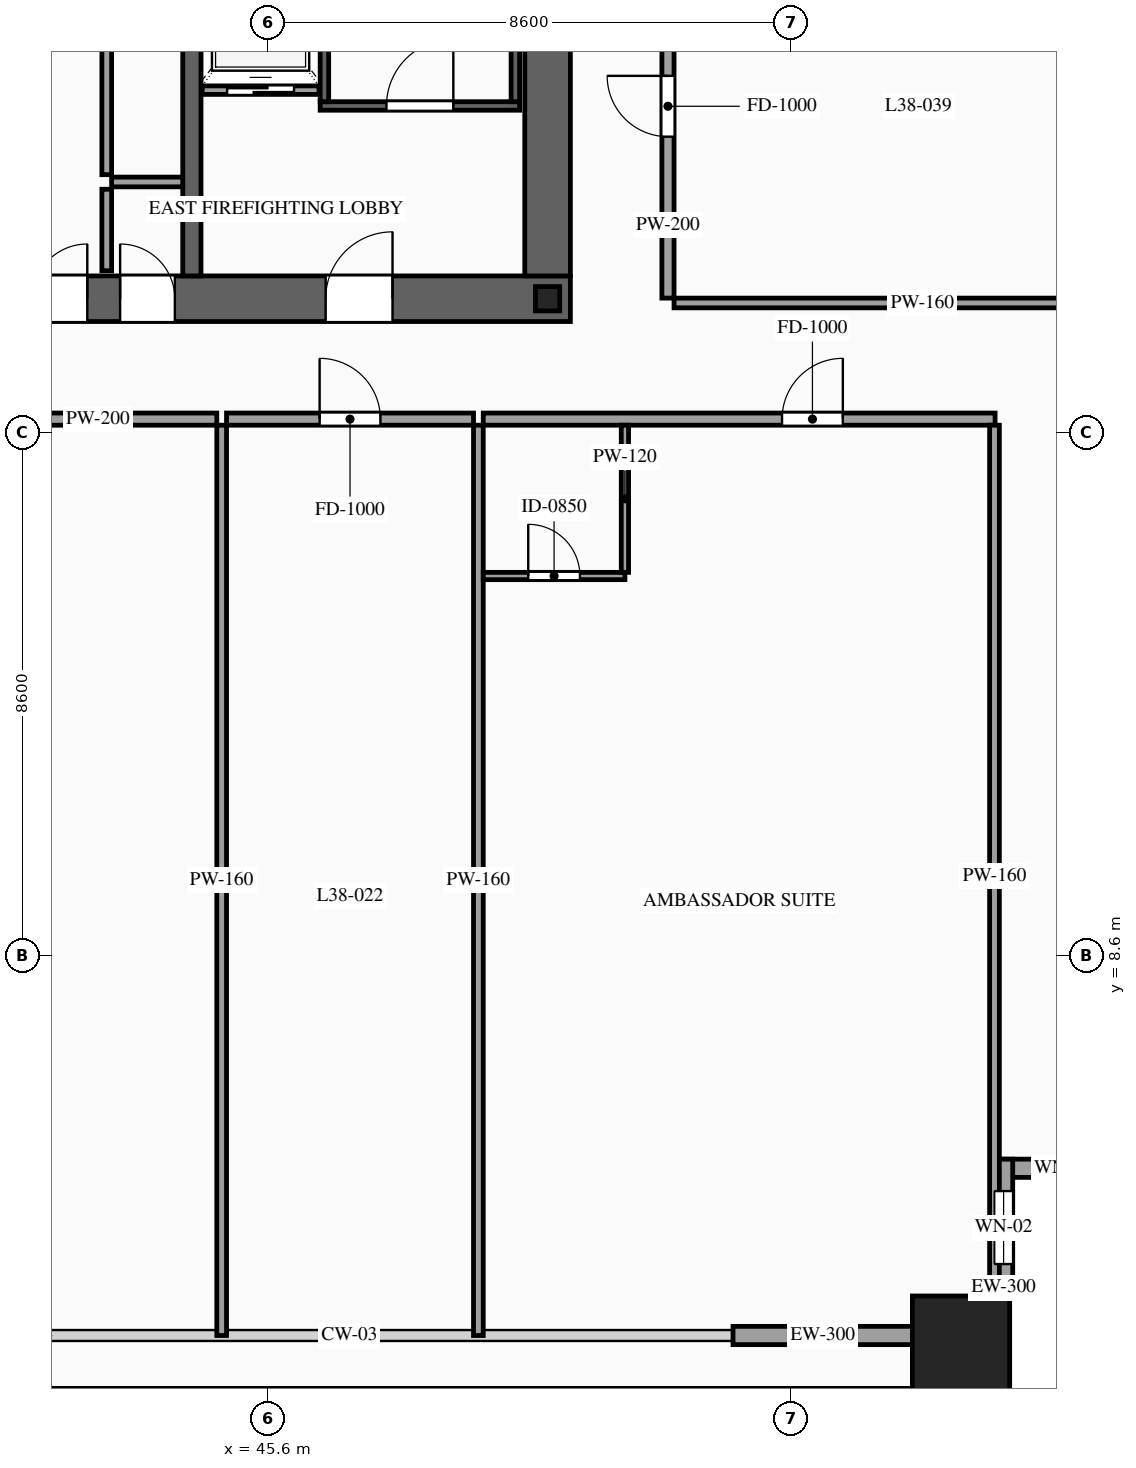
"""IFC4 building model, lengths in metres.
Left out: names, types, materials, properties, quantities, classifications, styles, units other than length and angle.
Written with IfcOpenShell. Run it as: python <this file> out.ifc"""

import sys

from ifc_helpers import new_model, si_unit, direction, frame, frame_2d, origin, origin_2d, place, context, subcontext, project, spatial, rectangle, hollow_rectangle, i_section, extrude, source, transform, mapped, element, fill, save


model = new_model("IFC4")
c1 = context("Model", 3, precision=1e-05, world=origin(), true_north=direction((0.0, 1.0)))
c2 = subcontext(c1, "Body", "Model", "MODEL_VIEW")
j1 = project(units=[si_unit("LENGTHUNIT", "METRE"), si_unit("PLANEANGLEUNIT", "RADIAN")], contexts=[c1])
p1 = place(None, origin())
s1 = spatial("IfcSite", under=j1, at=p1, CompositionType="ELEMENT")
p2 = place(p1, origin())
s2 = spatial("IfcBuilding", under=s1, at=p2, CompositionType="ELEMENT")
p3 = place(p2, frame((0.0, 0.0, 145.2)))
s3 = spatial("IfcBuildingStorey", under=s2, at=p3, CompositionType="ELEMENT", Elevation=145.2)
p4 = place(p3, frame((23.425, 19.4, 0.0), z_axis=(0.0, 0.0, 1.0), x_axis=(1.0, 0.0, 0.0)))
e1 = element("IfcWall", 1, at=p4, inside=s3, PredefinedType="SHEAR", context=c2, shape_type="SweptSolid", body=[
    extrude(rectangle(XDim=27.15, YDim=0.75, at=frame_2d((13.575, 0.0))), origin(), (0.0, 0.0, 1.0), 3.6),
])
p5 = place(p4, frame((2.025, 0.0, 0.0)))
e2 = element("IfcOpeningElement", 2, at=p5, cuts=e1, PredefinedType="OPENING", context=c2, shape_type="SweptSolid", body=[
    extrude(rectangle(XDim=1.1, YDim=2.2, at=frame_2d((0.55, 1.1))), frame((0.0, 0.39, 0.0), z_axis=(0.0, -1.0, 0.0), x_axis=(1.0, 0.0, 0.0)), (0.0, 0.0, 1.0), 0.78),
])
p6 = place(p4, frame((9.925, 0.0, 0.0)))
e3 = element("IfcOpeningElement", 3, at=p6, cuts=e1, PredefinedType="OPENING", context=c2, shape_type="SweptSolid", body=[
    extrude(rectangle(XDim=1.1, YDim=2.2, at=frame_2d((0.55, 1.1))), frame((0.0, 0.39, 0.0), z_axis=(0.0, -1.0, 0.0), x_axis=(1.0, 0.0, 0.0)), (0.0, 0.0, 1.0), 0.78),
])
p7 = place(p4, frame((23.125, 0.0, 0.0)))
e4 = element("IfcOpeningElement", 4, at=p7, cuts=e1, PredefinedType="OPENING", context=c2, shape_type="SweptSolid", body=[
    extrude(rectangle(XDim=1.1, YDim=2.2, at=frame_2d((0.55, 1.1))), frame((0.0, 0.39, 0.0), z_axis=(0.0, -1.0, 0.0), x_axis=(1.0, 0.0, 0.0)), (0.0, 0.0, 1.0), 0.78),
])
p8 = place(p4, frame((19.745, 0.0, 0.0)))
e5 = element("IfcOpeningElement", 5, at=p8, cuts=e1, PredefinedType="OPENING", context=c2, shape_type="SweptSolid", body=[
    extrude(rectangle(XDim=0.9, YDim=2.15, at=frame_2d((0.45, 1.075))), frame((0.0, 0.39, 0.0), z_axis=(0.0, -1.0, 0.0), x_axis=(1.0, 0.0, 0.0)), (0.0, 0.0, 1.0), 0.78),
])
p9 = place(p4, frame((18.305, 0.0, 0.0)))
e6 = element("IfcOpeningElement", 6, at=p9, cuts=e1, PredefinedType="OPENING", context=c2, shape_type="SweptSolid", body=[
    extrude(rectangle(XDim=0.9, YDim=2.15, at=frame_2d((0.45, 1.075))), frame((0.0, 0.39, 0.0), z_axis=(0.0, -1.0, 0.0), x_axis=(1.0, 0.0, 0.0)), (0.0, 0.0, 1.0), 0.78),
])
m1 = source(origin(), c2, "Body", "SweptSolid", [
    extrude(rectangle(XDim=12.05, YDim=0.75, at=frame_2d((6.025, 0.0))), origin(), (0.0, 0.0, 1.0), 3.6),
])
p10 = place(p3, frame((50.2, 19.775, 0.0), z_axis=(0.0, 0.0, 1.0), x_axis=(0.0, 1.0, 0.0)))
e7 = element("IfcWall", 7, at=p10, inside=s3, PredefinedType="SHEAR", context=c2, shape_type="MappedRepresentation", body=[
    mapped(m1, transform((0.0, 0.0, 0.0), scale=1.0)),
])
m2 = source(origin(), c2, "Body", "SweptSolid", [
    extrude(rectangle(XDim=12.05, YDim=0.3, at=frame_2d((6.025, 0.0))), origin(), (0.0, 0.0, 1.0), 3.6),
])
p11 = place(p3, frame((44.35, 19.775, 0.0), z_axis=(0.0, 0.0, 1.0), x_axis=(0.0, 1.0, 0.0)))
e8 = element("IfcWall", 8, at=p11, inside=s3, PredefinedType="SOLIDWALL", context=c2, shape_type="MappedRepresentation", body=[
    mapped(m2, transform((0.0, 0.0, 0.0), scale=1.0)),
])
m3 = source(origin(), c2, "Body", "SweptSolid", [
    extrude(i_section(OverallWidth=0.4, OverallDepth=0.4, WebThickness=0.013, FlangeThickness=0.021, at=origin_2d()), origin(), (0.0, 0.0, 1.0), 3.6),
])
p12 = place(p3, frame((50.2, 19.4, 0.0), z_axis=(0.0, 0.0, 1.0), x_axis=(1.0, 0.0, 0.0)))
e9 = element("IfcColumn", 9, at=p12, inside=s3, PredefinedType="COLUMN", context=c2, shape_type="MappedRepresentation", body=[
    mapped(m3, transform((0.0, 0.0, 0.0), scale=1.0)),
])
m4 = source(origin(), c2, "Body", "SweptSolid", [
    extrude(hollow_rectangle(XDim=1.6, YDim=1.6, WallThickness=0.07, at=origin_2d()), origin(), (0.0, 0.0, 1.0), 3.6),
])
p13 = place(p3, frame((57.0, 2.2, 0.0), z_axis=(0.0, 0.0, 1.0), x_axis=(1.0, 0.0, 0.0)))
e10 = element("IfcColumn", 10, at=p13, inside=s3, PredefinedType="COLUMN", context=c2, shape_type="MappedRepresentation", body=[
    mapped(m4, transform((0.0, 0.0, 0.0), scale=1.0)),
])
p14 = place(p3, frame((57.55, 5.1, 0.0), z_axis=(0.0, 0.0, 1.0), x_axis=(1.0, 0.0, 0.0)))
e11 = element("IfcWall", 11, at=p14, inside=s3, PredefinedType="SOLIDWALL", context=c2, shape_type="SweptSolid", body=[
    extrude(rectangle(XDim=2.25, YDim=0.3, at=frame_2d((1.125, 0.0))), origin(), (0.0, 0.0, 1.0), 3.38),
])
p15 = place(p14, frame((0.675, 0.0, 0.85)))
e12 = element("IfcOpeningElement", 12, at=p15, cuts=e11, PredefinedType="OPENING", context=c2, shape_type="SweptSolid", body=[
    extrude(rectangle(XDim=0.9, YDim=1.5, at=frame_2d((0.45, 0.75))), frame((0.0, 0.165, 0.0), z_axis=(0.0, -1.0, 0.0), x_axis=(1.0, 0.0, 0.0)), (0.0, 0.0, 1.0), 0.33),
])
p16 = place(p3, frame((57.7, 3.0, 0.0), z_axis=(0.0, 0.0, 1.0), x_axis=(0.0, 1.0, 0.0)))
e13 = element("IfcWall", 13, at=p16, inside=s3, PredefinedType="SOLIDWALL", context=c2, shape_type="SweptSolid", body=[
    extrude(rectangle(XDim=2.25, YDim=0.3, at=frame_2d((1.125, 0.0))), origin(), (0.0, 0.0, 1.0), 3.38),
])
p17 = place(p16, frame((0.525, 0.0, 0.85)))
e14 = element("IfcOpeningElement", 14, at=p17, cuts=e13, PredefinedType="OPENING", context=c2, shape_type="SweptSolid", body=[
    extrude(rectangle(XDim=1.2, YDim=2.1, at=frame_2d((0.6, 1.05))), frame((0.0, 0.165, 0.0), z_axis=(0.0, -1.0, 0.0), x_axis=(1.0, 0.0, 0.0)), (0.0, 0.0, 1.0), 0.33),
])
m5 = source(origin(), c2, "Body", "SweptSolid", [
    extrude(rectangle(XDim=2.95, YDim=0.3, at=frame_2d((1.475, 0.0))), origin(), (0.0, 0.0, 1.0), 2.775),
])
p18 = place(p3, frame((53.25, 2.35, 0.0), z_axis=(0.0, 0.0, 1.0), x_axis=(1.0, 0.0, 0.0)))
e15 = element("IfcWall", 15, at=p18, inside=s3, PredefinedType="SOLIDWALL", context=c2, shape_type="MappedRepresentation", body=[
    mapped(m5, transform((0.0, 0.0, 0.0), scale=1.0)),
])
p19 = place(p3, frame((44.52, 22.83, 0.0), z_axis=(0.0, 0.0, 1.0), x_axis=(1.0, 0.0, 0.0)))
e16 = element("IfcWall", 16, at=p19, inside=s3, PredefinedType="SOLIDWALL", context=c2, shape_type="SweptSolid", body=[
    extrude(rectangle(XDim=1.92, YDim=0.14, at=frame_2d((0.96, 0.0))), origin(), (0.0, 0.0, 1.0), 3.38),
])
p20 = place(p19, frame((0.41, 0.0, 0.0)))
e17 = element("IfcOpeningElement", 17, at=p20, cuts=e16, PredefinedType="OPENING", context=c2, shape_type="SweptSolid", body=[
    extrude(rectangle(XDim=1.1, YDim=2.2, at=frame_2d((0.55, 1.1))), frame((0.0, 0.085, 0.0), z_axis=(0.0, -1.0, 0.0), x_axis=(1.0, 0.0, 0.0)), (0.0, 0.0, 1.0), 0.17),
])
p21 = place(p3, frame((46.46, 22.57, 0.0), z_axis=(0.0, 0.0, 1.0), x_axis=(1.0, 0.0, 0.0)))
e18 = element("IfcWall", 18, at=p21, inside=s3, PredefinedType="SOLIDWALL", context=c2, shape_type="SweptSolid", body=[
    extrude(rectangle(XDim=3.28, YDim=0.14, at=frame_2d((1.64, 0.0))), origin(), (0.0, 0.0, 1.0), 3.38),
])
p22 = place(p21, frame((1.09, 0.0, 0.0)))
e19 = element("IfcOpeningElement", 19, at=p22, cuts=e18, PredefinedType="OPENING", context=c2, shape_type="SweptSolid", body=[
    extrude(rectangle(XDim=1.1, YDim=2.2, at=frame_2d((0.55, 1.1))), frame((0.0, 0.085, 0.0), z_axis=(0.0, -1.0, 0.0), x_axis=(1.0, 0.0, 0.0)), (0.0, 0.0, 1.0), 0.17),
])
m6 = source(origin(), c2, "Body", "SweptSolid", [
    extrude(rectangle(XDim=8.94, YDim=0.14, at=frame_2d((4.47, 0.0))), origin(), (0.0, 0.0, 1.0), 3.38),
])
for number, where, z_axis, x_axis in (
    (20, (46.53, 22.64, 0.0), (0.0, 0.0, 1.0), (0.0, 1.0, 0.0)),
    (21, (49.67, 22.64, 0.0), (0.0, 0.0, 1.0), (0.0, 1.0, 0.0)),
):
    element("IfcWall", number, at=place(p3, frame(where, z_axis=z_axis, x_axis=x_axis)), inside=s3, PredefinedType="SOLIDWALL", context=c2, shape_type="MappedRepresentation", body=[
        mapped(m6, transform((0.0, 0.0, 0.0), scale=1.0)),
    ])
m7 = source(origin(), c2, "Body", "SweptSolid", [
    extrude(rectangle(XDim=1.34, YDim=0.16, at=frame_2d((0.67, 0.0))), origin(), (0.0, 0.0, 1.0), 3.38),
])
p23 = place(p3, frame((42.95, 19.86, 0.0), z_axis=(0.0, 0.0, 1.0), x_axis=(0.0, 1.0, 0.0)))
e22 = element("IfcWall", 22, at=p23, inside=s3, PredefinedType="PARTITIONING", context=c2, shape_type="MappedRepresentation", body=[
    mapped(m7, transform((0.0, 0.0, 0.0), scale=1.0)),
])
m8 = source(origin(), c2, "Body", "SweptSolid", [
    extrude(rectangle(XDim=1.17, YDim=0.16, at=frame_2d((0.585, 0.0))), origin(), (0.0, 0.0, 1.0), 3.38),
])
p24 = place(p3, frame((43.03, 21.32, 0.0), z_axis=(0.0, 0.0, 1.0), x_axis=(1.0, 0.0, 0.0)))
e23 = element("IfcWall", 23, at=p24, inside=s3, PredefinedType="PARTITIONING", context=c2, shape_type="MappedRepresentation", body=[
    mapped(m8, transform((0.0, 0.0, 0.0), scale=1.0)),
])
m9 = source(origin(), c2, "Body", "SweptSolid", [
    extrude(rectangle(XDim=10.72, YDim=0.16, at=frame_2d((5.36, 0.0))), origin(), (0.0, 0.0, 1.0), 3.38),
])
p25 = place(p3, frame((42.95, 21.44, 0.0), z_axis=(0.0, 0.0, 1.0), x_axis=(0.0, 1.0, 0.0)))
e24 = element("IfcWall", 24, at=p25, inside=s3, PredefinedType="PARTITIONING", context=c2, shape_type="MappedRepresentation", body=[
    mapped(m9, transform((0.0, 0.0, 0.0), scale=1.0)),
])
p26 = place(p3, frame((35.435, 17.42, 0.0), z_axis=(0.0, 0.0, 1.0), x_axis=(1.0, 0.0, 0.0)))
e25 = element("IfcWall", 25, at=p26, inside=s3, PredefinedType="PARTITIONING", context=c2, shape_type="SweptSolid", body=[
    extrude(rectangle(XDim=9.325, YDim=0.2, at=frame_2d((4.663, 0.0))), origin(), (0.0, 0.0, 1.0), 3.38),
])
p27 = place(p26, frame((4.162, 0.0, 0.0)))
e26 = element("IfcOpeningElement", 26, at=p27, cuts=e25, PredefinedType="OPENING", context=c2, shape_type="SweptSolid", body=[
    extrude(rectangle(XDim=1.0, YDim=2.2, at=frame_2d((0.5, 1.1))), frame((0.0, 0.115, 0.0), z_axis=(0.0, -1.0, 0.0), x_axis=(1.0, 0.0, 0.0)), (0.0, 0.0, 1.0), 0.23),
])
m10 = source(origin(), c2, "Body", "SweptSolid", [
    extrude(rectangle(XDim=14.97, YDim=0.16, at=frame_2d((7.485, 0.0))), origin(), (0.0, 0.0, 1.0), 3.38),
])
p28 = place(p3, frame((44.84, 2.35, 0.0), z_axis=(0.0, 0.0, 1.0), x_axis=(0.0, 1.0, 0.0)))
e27 = element("IfcWall", 27, at=p28, inside=s3, PredefinedType="PARTITIONING", context=c2, shape_type="MappedRepresentation", body=[
    mapped(m10, transform((0.0, 0.0, 0.0), scale=1.0)),
])
p29 = place(p3, frame((44.92, 17.42, 0.0), z_axis=(0.0, 0.0, 1.0), x_axis=(1.0, 0.0, 0.0)))
e28 = element("IfcWall", 28, at=p29, inside=s3, PredefinedType="PARTITIONING", context=c2, shape_type="SweptSolid", body=[
    extrude(rectangle(XDim=4.062, YDim=0.2, at=frame_2d((2.031, 0.0))), origin(), (0.0, 0.0, 1.0), 3.38),
])
p30 = place(p29, frame((1.531, 0.0, 0.0)))
e29 = element("IfcOpeningElement", 29, at=p30, cuts=e28, PredefinedType="OPENING", context=c2, shape_type="SweptSolid", body=[
    extrude(rectangle(XDim=1.0, YDim=2.2, at=frame_2d((0.5, 1.1))), frame((0.0, 0.115, 0.0), z_axis=(0.0, -1.0, 0.0), x_axis=(1.0, 0.0, 0.0)), (0.0, 0.0, 1.0), 0.23),
])
p31 = place(p3, frame((49.062, 2.35, 0.0), z_axis=(0.0, 0.0, 1.0), x_axis=(0.0, 1.0, 0.0)))
e30 = element("IfcWall", 30, at=p31, inside=s3, PredefinedType="PARTITIONING", context=c2, shape_type="MappedRepresentation", body=[
    mapped(m10, transform((0.0, 0.0, 0.0), scale=1.0)),
])
p32 = place(p3, frame((49.142, 17.42, 0.0), z_axis=(0.0, 0.0, 1.0), x_axis=(1.0, 0.0, 0.0)))
e31 = element("IfcWall", 31, at=p32, inside=s3, PredefinedType="PARTITIONING", context=c2, shape_type="SweptSolid", body=[
    extrude(rectangle(XDim=8.418, YDim=0.2, at=frame_2d((4.209, 0.0))), origin(), (0.0, 0.0, 1.0), 3.38),
])
p33 = place(p32, frame((4.914, 0.0, 0.0)))
e32 = element("IfcOpeningElement", 32, at=p33, cuts=e31, PredefinedType="OPENING", context=c2, shape_type="SweptSolid", body=[
    extrude(rectangle(XDim=1.0, YDim=2.2, at=frame_2d((0.5, 1.1))), frame((0.0, 0.115, 0.0), z_axis=(0.0, -1.0, 0.0), x_axis=(1.0, 0.0, 0.0)), (0.0, 0.0, 1.0), 0.23),
])
m11 = source(origin(), c2, "Body", "SweptSolid", [
    extrude(rectangle(XDim=14.82, YDim=0.16, at=frame_2d((7.41, 0.0))), origin(), (0.0, 0.0, 1.0), 3.38),
])
p34 = place(p3, frame((57.55, 2.5, 0.0), z_axis=(0.0, 0.0, 1.0), x_axis=(0.0, 1.0, 0.0)))
e33 = element("IfcWall", 33, at=p34, inside=s3, PredefinedType="PARTITIONING", context=c2, shape_type="MappedRepresentation", body=[
    mapped(m11, transform((0.0, 0.0, 0.0), scale=1.0)),
])
p35 = place(p3, frame((49.142, 14.84, 0.0), z_axis=(0.0, 0.0, 1.0), x_axis=(1.0, 0.0, 0.0)))
e34 = element("IfcWall", 34, at=p35, inside=s3, PredefinedType="PARTITIONING", context=c2, shape_type="SweptSolid", body=[
    extrude(rectangle(XDim=2.33, YDim=0.12, at=frame_2d((1.165, 0.0))), origin(), (0.0, 0.0, 1.0), 3.38),
])
p36 = place(p35, frame((0.74, 0.0, 0.0)))
e35 = element("IfcOpeningElement", 35, at=p36, cuts=e34, PredefinedType="OPENING", context=c2, shape_type="SweptSolid", body=[
    extrude(rectangle(XDim=0.85, YDim=2.1, at=frame_2d((0.425, 1.05))), frame((0.0, 0.075, 0.0), z_axis=(0.0, -1.0, 0.0), x_axis=(1.0, 0.0, 0.0)), (0.0, 0.0, 1.0), 0.15),
])
m12 = source(origin(), c2, "Body", "SweptSolid", [
    extrude(rectangle(XDim=2.42, YDim=0.12, at=frame_2d((1.21, 0.0))), origin(), (0.0, 0.0, 1.0), 3.38),
])
p37 = place(p3, frame((51.472, 14.9, 0.0), z_axis=(0.0, 0.0, 1.0), x_axis=(0.0, 1.0, 0.0)))
e36 = element("IfcWall", 36, at=p37, inside=s3, PredefinedType="PARTITIONING", context=c2, shape_type="MappedRepresentation", body=[
    mapped(m12, transform((0.0, 0.0, 0.0), scale=1.0)),
])
p38 = place(p3, frame((52.18, 19.41, 0.0), z_axis=(0.0, 0.0, 1.0), x_axis=(0.0, 1.0, 0.0)))
e37 = element("IfcWall", 37, at=p38, inside=s3, PredefinedType="PARTITIONING", context=c2, shape_type="SweptSolid", body=[
    extrude(rectangle(XDim=6.31, YDim=0.2, at=frame_2d((3.155, 0.0))), origin(), (0.0, 0.0, 1.0), 3.38),
])
p39 = place(p38, frame((2.655, 0.0, 0.0)))
e38 = element("IfcOpeningElement", 38, at=p39, cuts=e37, PredefinedType="OPENING", context=c2, shape_type="SweptSolid", body=[
    extrude(rectangle(XDim=1.0, YDim=2.2, at=frame_2d((0.5, 1.1))), frame((0.0, 0.115, 0.0), z_axis=(0.0, -1.0, 0.0), x_axis=(1.0, 0.0, 0.0)), (0.0, 0.0, 1.0), 0.23),
])
m13 = source(origin(), c2, "Body", "SweptSolid", [
    extrude(rectangle(XDim=8.17, YDim=0.16, at=frame_2d((4.085, 0.0))), origin(), (0.0, 0.0, 1.0), 2.875),
])
p40 = place(p3, frame((52.28, 19.33, 0.0), z_axis=(0.0, 0.0, 1.0), x_axis=(1.0, 0.0, 0.0)))
e39 = element("IfcWall", 39, at=p40, inside=s3, PredefinedType="PARTITIONING", context=c2, shape_type="MappedRepresentation", body=[
    mapped(m13, transform((0.0, 0.0, 0.0), scale=1.0)),
])
m14 = source(origin(), c2, "Body", "SweptSolid", [
    extrude(rectangle(XDim=0.9, YDim=1.5, at=frame_2d((0.45, 0.75))), frame((0.0, 0.03, 0.0), z_axis=(0.0, -1.0, 0.0), x_axis=(1.0, 0.0, 0.0)), (0.0, 0.0, 1.0), 0.06),
])
p41 = place(p15, origin())
e40 = element("IfcWindow", 40, at=p41, inside=s3, PartitioningType="SINGLE_PANEL", PredefinedType="WINDOW", context=c2, shape_type="MappedRepresentation", body=[
    mapped(m14, transform((0.0, 0.0, 0.0), scale=1.0)),
])
fill(e12, e40)
m15 = source(origin(), c2, "Body", "SweptSolid", [
    extrude(rectangle(XDim=1.2, YDim=2.1, at=frame_2d((0.6, 1.05))), frame((0.0, 0.03, 0.0), z_axis=(0.0, -1.0, 0.0), x_axis=(1.0, 0.0, 0.0)), (0.0, 0.0, 1.0), 0.06),
])
p42 = place(p17, origin())
e41 = element("IfcWindow", 41, at=p42, inside=s3, PartitioningType="SINGLE_PANEL", PredefinedType="WINDOW", context=c2, shape_type="MappedRepresentation", body=[
    mapped(m15, transform((0.0, 0.0, 0.0), scale=1.0)),
])
fill(e14, e41)
m16 = source(origin(), c2, "Body", "SweptSolid", [
    extrude(rectangle(XDim=1.1, YDim=2.2, at=frame_2d((0.55, 1.1))), frame((0.0, 0.025, 0.0), z_axis=(0.0, -1.0, 0.0), x_axis=(1.0, 0.0, 0.0)), (0.0, 0.0, 1.0), 0.05),
])
p43 = place(p20, origin())
e42 = element("IfcDoor", 42, at=p43, inside=s3, OperationType="SLIDING_TO_RIGHT", PredefinedType="DOOR", context=c2, shape_type="MappedRepresentation", body=[
    mapped(m16, transform((0.0, 0.0, 0.0), scale=1.0)),
])
fill(e17, e42)
m17 = source(origin(), c2, "Body", "SweptSolid", [
    extrude(rectangle(XDim=1.1, YDim=2.2, at=frame_2d((0.55, 1.1))), frame((0.0, 0.025, 0.0), z_axis=(0.0, -1.0, 0.0), x_axis=(1.0, 0.0, 0.0)), (0.0, 0.0, 1.0), 0.05),
])
p44 = place(p22, origin())
e43 = element("IfcDoor", 43, at=p44, inside=s3, OperationType="SINGLE_SWING_RIGHT", PredefinedType="DOOR", context=c2, shape_type="MappedRepresentation", body=[
    mapped(m17, transform((0.0, 0.0, 0.0), scale=1.0)),
])
fill(e19, e43)
p45 = place(p7, origin())
e44 = element("IfcDoor", 44, at=p45, inside=s3, OperationType="SINGLE_SWING_RIGHT", PredefinedType="DOOR", context=c2, shape_type="MappedRepresentation", body=[
    mapped(m17, transform((0.0, 0.0, 0.0), scale=1.0)),
])
fill(e4, e44)
m18 = source(origin(), c2, "Body", "SweptSolid", [
    extrude(rectangle(XDim=0.9, YDim=2.15, at=frame_2d((0.45, 1.075))), frame((0.0, 0.025, 0.0), z_axis=(0.0, -1.0, 0.0), x_axis=(1.0, 0.0, 0.0)), (0.0, 0.0, 1.0), 0.05),
])
p46 = place(p8, origin())
e45 = element("IfcDoor", 45, at=p46, inside=s3, OperationType="SINGLE_SWING_LEFT", PredefinedType="DOOR", context=c2, shape_type="MappedRepresentation", body=[
    mapped(m18, transform((0.0, 0.0, 0.0), scale=1.0)),
])
fill(e5, e45)
p47 = place(p9, origin())
e46 = element("IfcDoor", 46, at=p47, inside=s3, OperationType="SINGLE_SWING_RIGHT", PredefinedType="DOOR", context=c2, shape_type="MappedRepresentation", body=[
    mapped(m18, transform((0.0, 0.0, 0.0), scale=1.0)),
])
fill(e6, e46)
m19 = source(origin(), c2, "Body", "SweptSolid", [
    extrude(rectangle(XDim=1.0, YDim=2.2, at=frame_2d((0.5, 1.1))), frame((0.0, 0.025, 0.0), z_axis=(0.0, -1.0, 0.0), x_axis=(1.0, 0.0, 0.0)), (0.0, 0.0, 1.0), 0.05),
])
p48 = place(p30, origin())
e47 = element("IfcDoor", 47, at=p48, inside=s3, OperationType="SINGLE_SWING_LEFT", PredefinedType="DOOR", context=c2, shape_type="MappedRepresentation", body=[
    mapped(m19, transform((0.0, 0.0, 0.0), scale=1.0)),
])
fill(e29, e47)
p49 = place(p33, origin())
e48 = element("IfcDoor", 48, at=p49, inside=s3, OperationType="SINGLE_SWING_RIGHT", PredefinedType="DOOR", context=c2, shape_type="MappedRepresentation", body=[
    mapped(m19, transform((0.0, 0.0, 0.0), scale=1.0)),
])
fill(e32, e48)
m20 = source(origin(), c2, "Body", "SweptSolid", [
    extrude(rectangle(XDim=0.85, YDim=2.1, at=frame_2d((0.425, 1.05))), frame((0.0, 0.025, 0.0), z_axis=(0.0, -1.0, 0.0), x_axis=(1.0, 0.0, 0.0)), (0.0, 0.0, 1.0), 0.05),
])
p50 = place(p36, origin())
e49 = element("IfcDoor", 49, at=p50, inside=s3, OperationType="SINGLE_SWING_LEFT", PredefinedType="DOOR", context=c2, shape_type="MappedRepresentation", body=[
    mapped(m20, transform((0.0, 0.0, 0.0), scale=1.0)),
])
fill(e35, e49)
p51 = place(p39, origin())
e50 = element("IfcDoor", 50, at=p51, inside=s3, OperationType="SINGLE_SWING_RIGHT", PredefinedType="DOOR", context=c2, shape_type="MappedRepresentation", body=[
    mapped(m19, transform((0.0, 0.0, 0.0), scale=1.0)),
])
fill(e38, e50)
save(model, sys.argv[1])
